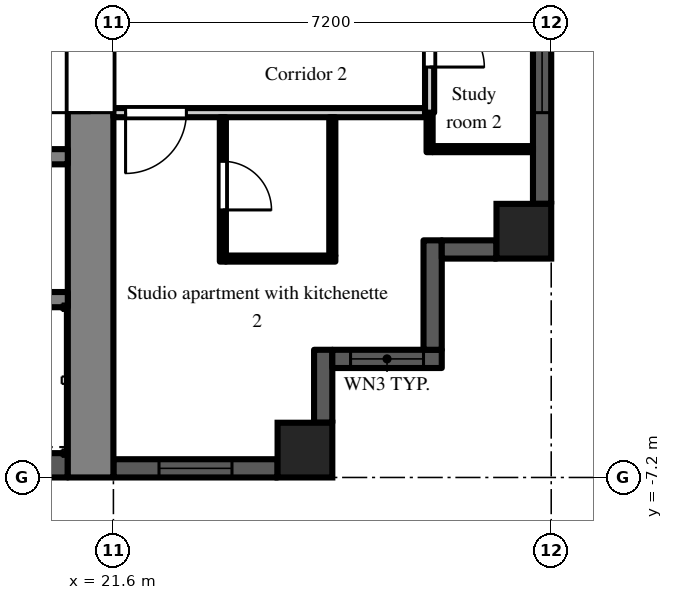
"""IFC4 building model, lengths in metres.
Left out: names, types, materials, properties, quantities, classifications, styles, units other than length and angle.
Written with IfcOpenShell. Run it as: python <this file> out.ifc"""

import sys

from ifc_helpers import new_model, si_unit, direction, frame, frame_2d, origin, origin_2d, place, context, subcontext, project, spatial, rectangle, extrude, element, fill, save


model = new_model("IFC4")
c1 = context("Model", 3, precision=1e-05, world=origin(), true_north=direction((0.0, 1.0)))
c2 = subcontext(c1, "Body", "Model", "MODEL_VIEW")
j1 = project(units=[si_unit("LENGTHUNIT", "METRE"), si_unit("PLANEANGLEUNIT", "RADIAN")], contexts=[c1])
p1 = place(None, origin())
s1 = spatial("IfcSite", under=j1, at=p1, CompositionType="ELEMENT")
p2 = place(p1, origin())
s2 = spatial("IfcBuilding", under=s1, at=p2, CompositionType="ELEMENT")
p3 = place(p2, frame((0.0, 0.0, 225.9)))
s3 = spatial("IfcBuildingStorey", under=s2, at=p3, CompositionType="ELEMENT", Elevation=225.9)
for number, where, z_axis, x_axis in (
    (1, (24.75, -6.75, 0.0), (0.0, 0.0, 1.0), (1.0, 0.0, 0.0)),
    (2, (28.35, -3.15, 0.0), (0.0, 0.0, 1.0), (1.0, 0.0, 0.0)),
):
    element("IfcColumn", number, at=place(p3, frame(where, z_axis=z_axis, x_axis=x_axis)), inside=s3, PredefinedType="COLUMN", context=c2, shape_type="SweptSolid", body=[
        extrude(rectangle(XDim=0.9, YDim=0.9, at=origin_2d()), origin(), (0.0, 0.0, 1.0), 3.0),
    ])
p4 = place(p3, frame((21.6, -7.05, 0.0), z_axis=(0.0, 0.0, 1.0), x_axis=(1.0, 0.0, 0.0)))
e3 = element("IfcWall", 3, at=p4, inside=s3, PredefinedType="SOLIDWALL", context=c2, shape_type="SweptSolid", body=[
    extrude(rectangle(XDim=2.7, YDim=0.3, at=frame_2d((1.35, 0.0))), origin(), (0.0, 0.0, 1.0), 2.3),
])
p5 = place(p4, frame((0.75, 0.0, 0.2)))
e4 = element("IfcOpeningElement", 4, at=p5, cuts=e3, PredefinedType="OPENING", context=c2, shape_type="SweptSolid", body=[
    extrude(rectangle(XDim=1.2, YDim=1.85, at=frame_2d((0.6, 0.925))), frame((0.0, 0.16, 0.0), z_axis=(0.0, -1.0, 0.0), x_axis=(1.0, 0.0, 0.0)), (0.0, 0.0, 1.0), 0.32),
])
p6 = place(p3, frame((25.05, -6.3, 0.0), z_axis=(0.0, 0.0, 1.0), x_axis=(0.0, 1.0, 0.0)))
e5 = element("IfcWall", 5, at=p6, inside=s3, PredefinedType="SOLIDWALL", context=c2, shape_type="SweptSolid", body=[
    extrude(rectangle(XDim=1.2, YDim=0.3, at=frame_2d((0.6, 0.0))), origin(), (0.0, 0.0, 1.0), 2.6),
])
p7 = place(p3, frame((25.2, -5.25, 0.0), z_axis=(0.0, 0.0, 1.0), x_axis=(1.0, 0.0, 0.0)))
e6 = element("IfcWall", 6, at=p7, inside=s3, PredefinedType="SOLIDWALL", context=c2, shape_type="SweptSolid", body=[
    extrude(rectangle(XDim=1.8, YDim=0.3, at=frame_2d((0.9, 0.0))), origin(), (0.0, 0.0, 1.0), 2.6),
])
p8 = place(p7, frame((0.3, 0.0, 0.2)))
e7 = element("IfcOpeningElement", 7, at=p8, cuts=e6, PredefinedType="OPENING", context=c2, shape_type="SweptSolid", body=[
    extrude(rectangle(XDim=1.2, YDim=1.85, at=frame_2d((0.6, 0.925))), frame((0.0, 0.16, 0.0), z_axis=(0.0, -1.0, 0.0), x_axis=(1.0, 0.0, 0.0)), (0.0, 0.0, 1.0), 0.32),
])
p9 = place(p3, frame((26.85, -5.1, 0.0), z_axis=(0.0, 0.0, 1.0), x_axis=(0.0, 1.0, 0.0)))
e8 = element("IfcWall", 8, at=p9, inside=s3, PredefinedType="SOLIDWALL", context=c2, shape_type="SweptSolid", body=[
    extrude(rectangle(XDim=1.8, YDim=0.3, at=frame_2d((0.9, 0.0))), origin(), (0.0, 0.0, 1.0), 2.6),
])
p10 = place(p3, frame((27.0, -3.45, 0.0), z_axis=(0.0, 0.0, 1.0), x_axis=(1.0, 0.0, 0.0)))
e9 = element("IfcWall", 9, at=p10, inside=s3, PredefinedType="SOLIDWALL", context=c2, shape_type="SweptSolid", body=[
    extrude(rectangle(XDim=0.9, YDim=0.3, at=frame_2d((0.45, 0.0))), origin(), (0.0, 0.0, 1.0), 2.6),
])
p11 = place(p3, frame((28.65, -2.7, 0.0), z_axis=(0.0, 0.0, 1.0), x_axis=(0.0, 1.0, 0.0)))
e10 = element("IfcWall", 10, at=p11, inside=s3, PredefinedType="SOLIDWALL", context=c2, shape_type="SweptSolid", body=[
    extrude(rectangle(XDim=5.4, YDim=0.3, at=frame_2d((2.7, 0.0))), origin(), (0.0, 0.0, 1.0), 2.3),
])
p12 = place(p11, frame((1.5, 0.0, 0.2)))
e11 = element("IfcOpeningElement", 11, at=p12, cuts=e10, PredefinedType="OPENING", context=c2, shape_type="SweptSolid", body=[
    extrude(rectangle(XDim=2.4, YDim=1.85, at=frame_2d((1.2, 0.925))), frame((0.0, 0.16, 0.0), z_axis=(0.0, -1.0, 0.0), x_axis=(1.0, 0.0, 0.0)), (0.0, 0.0, 1.0), 0.32),
])
p13 = place(p3, frame((21.225, -7.2, 0.0), z_axis=(0.0, 0.0, 1.0), x_axis=(0.0, 1.0, 0.0)))
e12 = element("IfcWall", 12, at=p13, inside=s3, PredefinedType="SHEAR", context=c2, shape_type="SweptSolid", body=[
    extrude(rectangle(XDim=14.4, YDim=0.75, at=frame_2d((7.2, 0.0))), origin(), (0.0, 0.0, 1.0), 2.6),
])
p14 = place(p13, frame((6.0, 0.0, 0.0)))
e13 = element("IfcOpeningElement", 13, at=p14, cuts=e12, PredefinedType="OPENING", context=c2, shape_type="SweptSolid", body=[
    extrude(rectangle(XDim=2.4, YDim=2.2, at=frame_2d((1.2, 1.1))), frame((0.0, 0.385, 0.0), z_axis=(0.0, -1.0, 0.0), x_axis=(1.0, 0.0, 0.0)), (0.0, 0.0, 1.0), 0.77),
])
p15 = place(p3, frame((7.9, -7.0, 0.0), z_axis=(0.0, 0.0, 1.0), x_axis=(1.0, 0.0, 0.0)))
e14 = element("IfcWall", 14, at=p15, inside=s3, PredefinedType="SHEAR", context=c2, shape_type="SweptSolid", body=[
    extrude(rectangle(XDim=12.95, YDim=0.4, at=frame_2d((6.475, 0.0))), origin(), (0.0, 0.0, 1.0), 2.6),
])
p16 = place(p3, frame((7.9, -1.925, 0.0), z_axis=(0.0, 0.0, 1.0), x_axis=(1.0, 0.0, 0.0)))
e15 = element("IfcWall", 15, at=p16, inside=s3, PredefinedType="SHEAR", context=c2, shape_type="SweptSolid", body=[
    extrude(rectangle(XDim=12.95, YDim=0.25, at=frame_2d((6.475, 0.0))), origin(), (0.0, 0.0, 1.0), 2.6),
])
p17 = place(p16, frame((0.525, 0.0, 0.0)))
e16 = element("IfcOpeningElement", 16, at=p17, cuts=e15, PredefinedType="OPENING", context=c2, shape_type="SweptSolid", body=[
    extrude(rectangle(XDim=0.9, YDim=2.1, at=frame_2d((0.45, 1.05))), frame((0.0, 0.135, 0.0), z_axis=(0.0, -1.0, 0.0), x_axis=(1.0, 0.0, 0.0)), (0.0, 0.0, 1.0), 0.27),
])
p18 = place(p16, frame((2.625, 0.0, 0.0)))
e17 = element("IfcOpeningElement", 17, at=p18, cuts=e15, PredefinedType="OPENING", context=c2, shape_type="SweptSolid", body=[
    extrude(rectangle(XDim=1.1, YDim=2.1, at=frame_2d((0.55, 1.05))), frame((0.0, 0.135, 0.0), z_axis=(0.0, -1.0, 0.0), x_axis=(1.0, 0.0, 0.0)), (0.0, 0.0, 1.0), 0.27),
])
p19 = place(p16, frame((6.025, 0.0, 0.0)))
e18 = element("IfcOpeningElement", 18, at=p19, cuts=e15, PredefinedType="OPENING", context=c2, shape_type="SweptSolid", body=[
    extrude(rectangle(XDim=0.9, YDim=2.1, at=frame_2d((0.45, 1.05))), frame((0.0, 0.135, 0.0), z_axis=(0.0, -1.0, 0.0), x_axis=(1.0, 0.0, 0.0)), (0.0, 0.0, 1.0), 0.27),
])
p20 = place(p16, frame((10.425, 0.0, 0.0)))
e19 = element("IfcOpeningElement", 19, at=p20, cuts=e15, PredefinedType="OPENING", context=c2, shape_type="SweptSolid", body=[
    extrude(rectangle(XDim=0.9, YDim=2.1, at=frame_2d((0.45, 1.05))), frame((0.0, 0.135, 0.0), z_axis=(0.0, -1.0, 0.0), x_axis=(1.0, 0.0, 0.0)), (0.0, 0.0, 1.0), 0.27),
])
p21 = place(p3, frame((12.3, -4.275, 0.0), z_axis=(0.0, 0.0, 1.0), x_axis=(1.0, 0.0, 0.0)))
e20 = element("IfcWall", 20, at=p21, inside=s3, PredefinedType="SHEAR", context=c2, shape_type="SweptSolid", body=[
    extrude(rectangle(XDim=8.55, YDim=0.25, at=frame_2d((4.275, 0.0))), origin(), (0.0, 0.0, 1.0), 2.6),
])
p22 = place(p3, frame((21.6, -1.2, 0.0), z_axis=(0.0, 0.0, 1.0), x_axis=(1.0, 0.0, 0.0)))
e21 = element("IfcWall", 21, at=p22, inside=s3, PredefinedType="PARTITIONING", context=c2, shape_type="SweptSolid", body=[
    extrude(rectangle(XDim=5.125, YDim=0.15, at=frame_2d((2.562, 0.0))), origin(), (0.0, 0.0, 1.0), 2.6),
])
p23 = place(p22, frame((0.2, 0.0, 0.0)))
e22 = element("IfcOpeningElement", 22, at=p23, cuts=e21, PredefinedType="OPENING", context=c2, shape_type="SweptSolid", body=[
    extrude(rectangle(XDim=1.0, YDim=2.1, at=frame_2d((0.5, 1.05))), frame((0.0, 0.085, 0.0), z_axis=(0.0, -1.0, 0.0), x_axis=(1.0, 0.0, 0.0)), (0.0, 0.0, 1.0), 0.17),
])
p24 = place(p3, frame((23.4, -3.65, 0.0), z_axis=(0.0, 0.0, 1.0), x_axis=(0.0, 1.0, 0.0)))
e23 = element("IfcWall", 23, at=p24, inside=s3, PredefinedType="PARTITIONING", context=c2, shape_type="SweptSolid", body=[
    extrude(rectangle(XDim=2.375, YDim=0.1, at=frame_2d((1.188, 0.0))), origin(), (0.0, 0.0, 1.0), 2.6),
])
p25 = place(p24, frame((0.85, 0.0, 0.0)))
e24 = element("IfcOpeningElement", 24, at=p25, cuts=e23, PredefinedType="OPENING", context=c2, shape_type="SweptSolid", body=[
    extrude(rectangle(XDim=0.8, YDim=2.1, at=frame_2d((0.4, 1.05))), frame((0.0, 0.06, 0.0), z_axis=(0.0, -1.0, 0.0), x_axis=(1.0, 0.0, 0.0)), (0.0, 0.0, 1.0), 0.12),
])
p26 = place(p3, frame((23.45, -3.6, 0.0), z_axis=(0.0, 0.0, 1.0), x_axis=(1.0, 0.0, 0.0)))
e25 = element("IfcWall", 25, at=p26, inside=s3, PredefinedType="PARTITIONING", context=c2, shape_type="SweptSolid", body=[
    extrude(rectangle(XDim=1.8, YDim=0.1, at=frame_2d((0.9, 0.0))), origin(), (0.0, 0.0, 1.0), 2.6),
])
p27 = place(p3, frame((25.2, -3.55, 0.0), z_axis=(0.0, 0.0, 1.0), x_axis=(0.0, 1.0, 0.0)))
e26 = element("IfcWall", 26, at=p27, inside=s3, PredefinedType="PARTITIONING", context=c2, shape_type="SweptSolid", body=[
    extrude(rectangle(XDim=2.275, YDim=0.1, at=frame_2d((1.138, 0.0))), origin(), (0.0, 0.0, 1.0), 2.6),
])
p28 = place(p3, frame((26.8, -1.85, 0.0), z_axis=(0.0, 0.0, 1.0), x_axis=(0.0, 1.0, 0.0)))
e27 = element("IfcWall", 27, at=p28, inside=s3, PredefinedType="PARTITIONING", context=c2, shape_type="SweptSolid", body=[
    extrude(rectangle(XDim=0.65, YDim=0.1, at=frame_2d((0.325, 0.0))), origin(), (0.0, 0.0, 1.0), 2.6),
])
p29 = place(p3, frame((26.85, -1.8, 0.0), z_axis=(0.0, 0.0, 1.0), x_axis=(1.0, 0.0, 0.0)))
e28 = element("IfcWall", 28, at=p29, inside=s3, PredefinedType="PARTITIONING", context=c2, shape_type="SweptSolid", body=[
    extrude(rectangle(XDim=1.65, YDim=0.1, at=frame_2d((0.825, 0.0))), origin(), (0.0, 0.0, 1.0), 2.6),
])
p30 = place(p3, frame((26.8, -1.2, 0.0), z_axis=(0.0, 0.0, 1.0), x_axis=(0.0, 1.0, 0.0)))
e29 = element("IfcWall", 29, at=p30, inside=s3, PredefinedType="PARTITIONING", context=c2, shape_type="SweptSolid", body=[
    extrude(rectangle(XDim=2.4, YDim=0.15, at=frame_2d((1.2, 0.0))), origin(), (0.0, 0.0, 1.0), 2.6),
])
p31 = place(p30, frame((0.75, 0.0, 0.0)))
e30 = element("IfcOpeningElement", 30, at=p31, cuts=e29, PredefinedType="OPENING", context=c2, shape_type="SweptSolid", body=[
    extrude(rectangle(XDim=0.9, YDim=2.1, at=frame_2d((0.45, 1.05))), frame((0.0, 0.085, 0.0), z_axis=(0.0, -1.0, 0.0), x_axis=(1.0, 0.0, 0.0)), (0.0, 0.0, 1.0), 0.17),
])
p32 = place(p5, origin())
e31 = element("IfcWindow", 31, at=p32, inside=s3, PartitioningType="SINGLE_PANEL", PredefinedType="WINDOW", context=c2, shape_type="SweptSolid", body=[
    extrude(rectangle(XDim=1.2, YDim=1.85, at=frame_2d((0.6, 0.925))), frame((0.0, 0.03, 0.0), z_axis=(0.0, -1.0, 0.0), x_axis=(1.0, 0.0, 0.0)), (0.0, 0.0, 1.0), 0.06),
])
fill(e4, e31)
p33 = place(p8, origin())
e32 = element("IfcWindow", 32, at=p33, inside=s3, PartitioningType="SINGLE_PANEL", PredefinedType="WINDOW", context=c2, shape_type="SweptSolid", body=[
    extrude(rectangle(XDim=1.2, YDim=1.85, at=frame_2d((0.6, 0.925))), frame((0.0, 0.03, 0.0), z_axis=(0.0, -1.0, 0.0), x_axis=(1.0, 0.0, 0.0)), (0.0, 0.0, 1.0), 0.06),
])
fill(e7, e32)
p34 = place(p12, origin())
e33 = element("IfcWindow", 33, at=p34, inside=s3, PartitioningType="SINGLE_PANEL", PredefinedType="WINDOW", context=c2, shape_type="SweptSolid", body=[
    extrude(rectangle(XDim=2.4, YDim=1.85, at=frame_2d((1.2, 0.925))), frame((0.0, 0.03, 0.0), z_axis=(0.0, -1.0, 0.0), x_axis=(1.0, 0.0, 0.0)), (0.0, 0.0, 1.0), 0.06),
])
fill(e11, e33)
p35 = place(p14, origin())
e34 = element("IfcDoor", 34, at=p35, inside=s3, OperationType="DOUBLE_DOOR_DOUBLE_SWING", PredefinedType="DOOR", context=c2, shape_type="SweptSolid", body=[
    extrude(rectangle(XDim=2.4, YDim=2.2, at=frame_2d((1.2, 1.1))), frame((0.0, 0.025, 0.0), z_axis=(0.0, -1.0, 0.0), x_axis=(1.0, 0.0, 0.0)), (0.0, 0.0, 1.0), 0.05),
])
fill(e13, e34)
p36 = place(p31, frame((0.9, 0.0, 0.0), z_axis=(0.0, 0.0, 1.0), x_axis=(-1.0, 0.0, 0.0)))
e35 = element("IfcDoor", 35, at=p36, inside=s3, OperationType="SINGLE_SWING_RIGHT", PredefinedType="DOOR", context=c2, shape_type="SweptSolid", body=[
    extrude(rectangle(XDim=0.9, YDim=2.1, at=frame_2d((0.45, 1.05))), frame((0.0, 0.025, 0.0), z_axis=(0.0, -1.0, 0.0), x_axis=(1.0, 0.0, 0.0)), (0.0, 0.0, 1.0), 0.05),
])
fill(e30, e35)
p37 = place(p25, frame((0.8, 0.0, 0.0), z_axis=(0.0, 0.0, 1.0), x_axis=(-1.0, 0.0, 0.0)))
e36 = element("IfcDoor", 36, at=p37, inside=s3, OperationType="SINGLE_SWING_RIGHT", PredefinedType="DOOR", context=c2, shape_type="SweptSolid", body=[
    extrude(rectangle(XDim=0.8, YDim=2.1, at=frame_2d((0.4, 1.05))), frame((0.0, 0.025, 0.0), z_axis=(0.0, -1.0, 0.0), x_axis=(1.0, 0.0, 0.0)), (0.0, 0.0, 1.0), 0.05),
])
fill(e24, e36)
p38 = place(p23, frame((1.0, 0.0, 0.0), z_axis=(0.0, 0.0, 1.0), x_axis=(-1.0, 0.0, 0.0)))
e37 = element("IfcDoor", 37, at=p38, inside=s3, OperationType="SINGLE_SWING_RIGHT", PredefinedType="DOOR", context=c2, shape_type="SweptSolid", body=[
    extrude(rectangle(XDim=1.0, YDim=2.1, at=frame_2d((0.5, 1.05))), frame((0.0, 0.025, 0.0), z_axis=(0.0, -1.0, 0.0), x_axis=(1.0, 0.0, 0.0)), (0.0, 0.0, 1.0), 0.05),
])
fill(e22, e37)
save(model, sys.argv[1])
